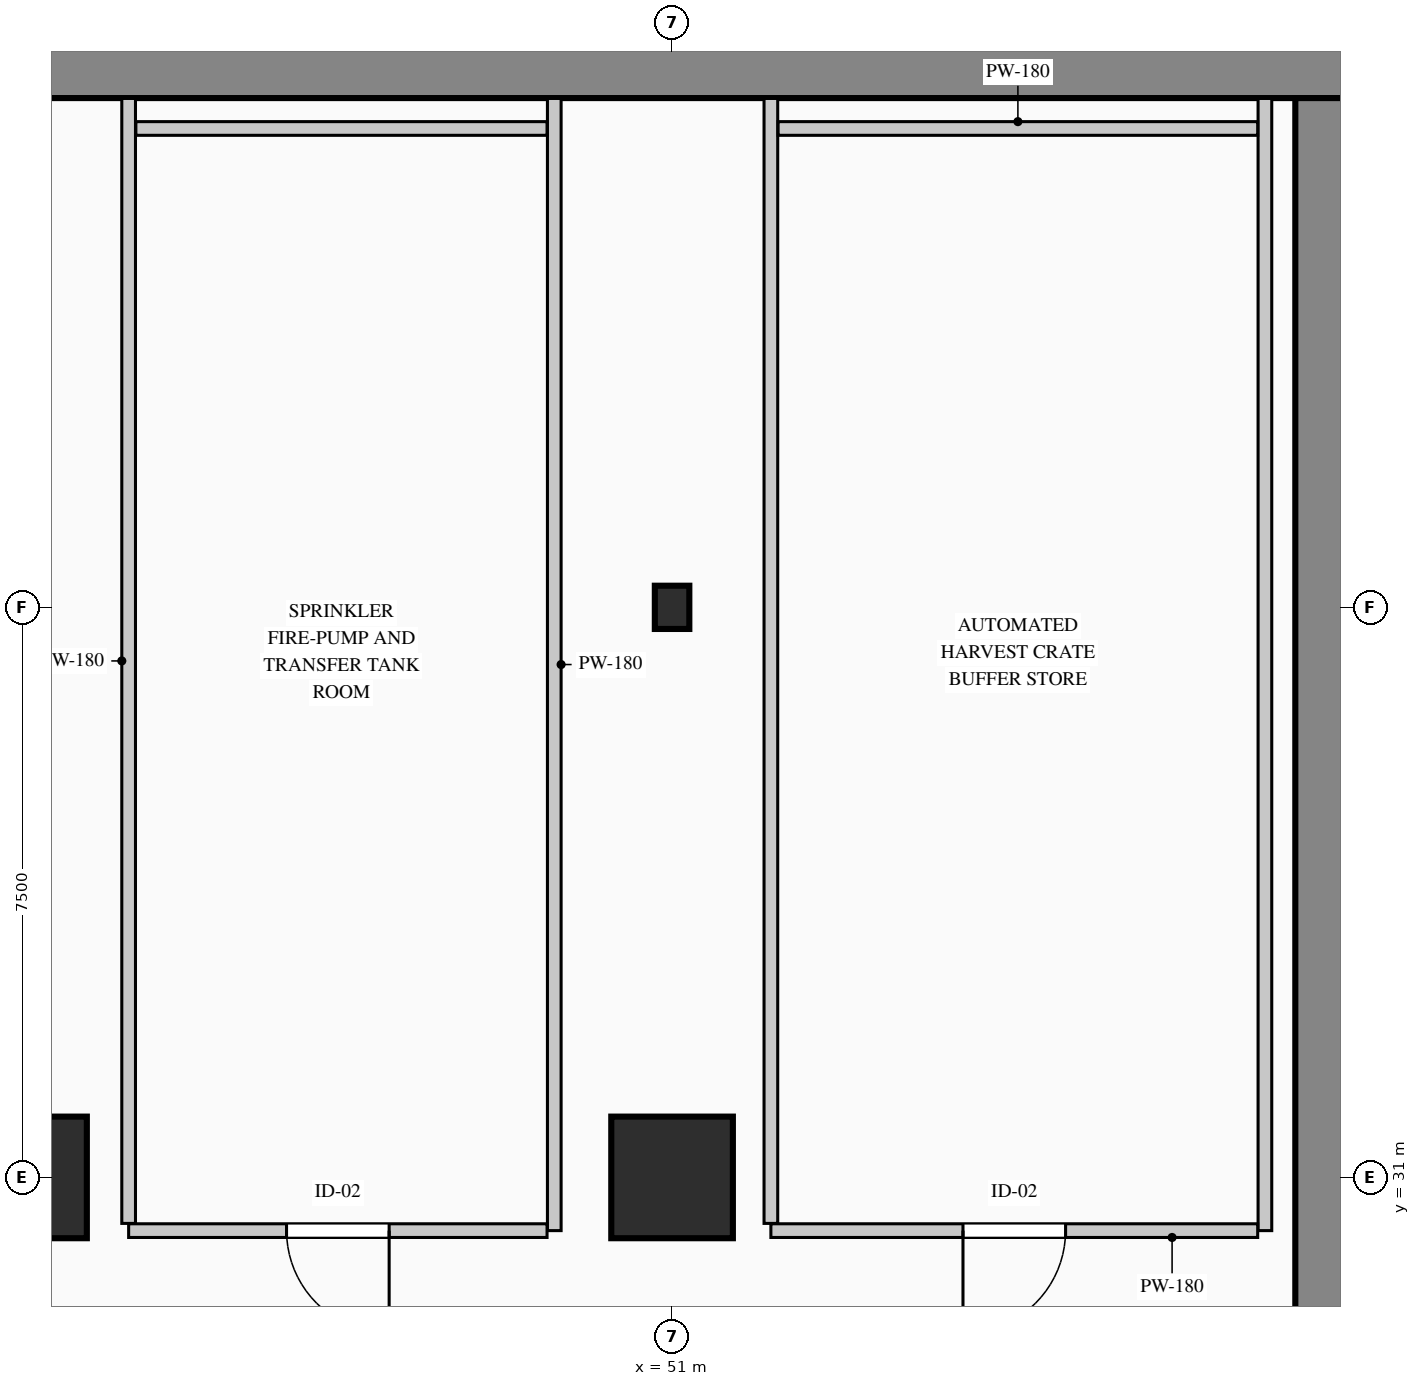
"""IFC4 building model, lengths in metres.
Left out: names, types, materials, properties, quantities, classifications, styles, units other than length and angle.
Written with IfcOpenShell. Run it as: python <this file> out.ifc"""

import sys

from ifc_helpers import new_model, si_unit, direction, frame, frame_2d, origin, origin_2d, place, context, subcontext, project, spatial, rectangle, i_section, extrude, element, fill, save


model = new_model("IFC4")
c1 = context("Model", 3, precision=1e-05, world=origin(), true_north=direction((0.0, 1.0)))
c2 = subcontext(c1, "Body", "Model", "MODEL_VIEW")
j1 = project(units=[si_unit("LENGTHUNIT", "METRE"), si_unit("PLANEANGLEUNIT", "RADIAN")], contexts=[c1])
p1 = place(None, origin())
s1 = spatial("IfcSite", under=j1, at=p1, CompositionType="ELEMENT")
p2 = place(p1, origin())
s2 = spatial("IfcBuilding", under=s1, at=p2, CompositionType="ELEMENT")
p3 = place(p2, frame((0.0, 0.0, -9.0)))
s3 = spatial("IfcBuildingStorey", under=s2, at=p3, CompositionType="ELEMENT", Elevation=-9.0)
p4 = place(p3, frame((0.0, 45.6, 0.0), z_axis=(0.0, 0.0, 1.0), x_axis=(1.0, 0.0, 0.0)))
e1 = element("IfcWall", 1, at=p4, inside=s3, PredefinedType="USERDEFINED", context=c2, shape_type="SweptSolid", body=[
    extrude(rectangle(XDim=60.0, YDim=0.8, at=frame_2d((30.0, 0.0))), origin(), (0.0, 0.0, 1.0), 4.5),
])
p5 = place(p3, frame((59.6, 0.8, 0.0), z_axis=(0.0, 0.0, 1.0), x_axis=(0.0, 1.0, 0.0)))
e2 = element("IfcWall", 2, at=p5, inside=s3, PredefinedType="USERDEFINED", context=c2, shape_type="SweptSolid", body=[
    extrude(rectangle(XDim=44.4, YDim=0.8, at=frame_2d((22.2, 0.0))), origin(), (0.0, 0.0, 1.0), 4.5),
])
for number, where, z_axis, x_axis in (
    (3, (42.5, 31.0, 0.0), (0.0, 0.0, 1.0), (1.0, 0.0, 0.0)),
    (4, (51.0, 31.0, 0.0), (0.0, 0.0, 1.0), (1.0, 0.0, 0.0)),
):
    element("IfcColumn", number, at=place(p3, frame(where, z_axis=z_axis, x_axis=x_axis)), inside=s3, PredefinedType="COLUMN", context=c2, shape_type="SweptSolid", body=[
        extrude(rectangle(XDim=1.6, YDim=1.6, at=origin_2d()), origin(), (0.0, 0.0, 1.0), 4.5),
    ])
p6 = place(p3, frame((51.0, 38.5, 0.0), z_axis=(0.0, 0.0, 1.0), x_axis=(1.0, 0.0, 0.0)))
e5 = element("IfcColumn", 5, at=p6, inside=s3, PredefinedType="COLUMN", context=c2, shape_type="SweptSolid", body=[
    extrude(i_section(OverallWidth=0.454, OverallDepth=0.569, WebThickness=0.078, FlangeThickness=0.08, FilletRadius=0.015, at=origin_2d()), origin(), (0.0, 0.0, 1.0), 4.5),
])
p7 = place(p3, frame((58.8, 45.195, 0.0), z_axis=(0.0, 0.0, 1.0), x_axis=(0.0, -1.0, 0.0)))
e6 = element("IfcWall", 6, at=p7, inside=s3, PredefinedType="PARTITIONING", context=c2, shape_type="SweptSolid", body=[
    extrude(rectangle(XDim=14.895, YDim=0.18, at=frame_2d((7.448, 0.0))), origin(), (0.0, 0.0, 1.0), 4.15),
])
p8 = place(p3, frame((58.705, 30.3, 0.0), z_axis=(0.0, 0.0, 1.0), x_axis=(-1.0, 0.0, 0.0)))
e7 = element("IfcWall", 7, at=p8, inside=s3, PredefinedType="PARTITIONING", context=c2, shape_type="SweptSolid", body=[
    extrude(rectangle(XDim=6.405, YDim=0.18, at=frame_2d((3.203, 0.0))), origin(), (0.0, 0.0, 1.0), 3.685),
])
p9 = place(p8, frame((2.528, 0.0, 0.0)))
e8 = element("IfcOpeningElement", 8, at=p9, cuts=e7, PredefinedType="OPENING", context=c2, shape_type="SweptSolid", body=[
    extrude(rectangle(XDim=1.35, YDim=2.2, at=frame_2d((0.675, 1.1))), frame((0.0, 0.1, 0.0), z_axis=(0.0, -1.0, 0.0), x_axis=(1.0, 0.0, 0.0)), (0.0, 0.0, 1.0), 0.2),
])
p10 = place(p3, frame((52.3, 30.395, 0.0), z_axis=(0.0, 0.0, 1.0), x_axis=(0.0, 1.0, 0.0)))
e9 = element("IfcWall", 9, at=p10, inside=s3, PredefinedType="PARTITIONING", context=c2, shape_type="SweptSolid", body=[
    extrude(rectangle(XDim=14.8, YDim=0.18, at=frame_2d((7.4, 0.0))), origin(), (0.0, 0.0, 1.0), 4.15),
])
p11 = place(p3, frame((52.395, 44.8, 0.0), z_axis=(0.0, 0.0, 1.0), x_axis=(1.0, 0.0, 0.0)))
e10 = element("IfcWall", 10, at=p11, inside=s3, PredefinedType="PARTITIONING", context=c2, shape_type="SweptSolid", body=[
    extrude(rectangle(XDim=6.31, YDim=0.18, at=frame_2d((3.155, 0.0))), origin(), (0.0, 0.0, 1.0), 4.15),
])
p12 = place(p3, frame((49.45, 45.195, 0.0), z_axis=(0.0, 0.0, 1.0), x_axis=(0.0, -1.0, 0.0)))
e11 = element("IfcWall", 11, at=p12, inside=s3, PredefinedType="PARTITIONING", context=c2, shape_type="SweptSolid", body=[
    extrude(rectangle(XDim=14.895, YDim=0.18, at=frame_2d((7.448, 0.0))), origin(), (0.0, 0.0, 1.0), 3.685),
])
p13 = place(p3, frame((49.355, 30.3, 0.0), z_axis=(0.0, 0.0, 1.0), x_axis=(-1.0, 0.0, 0.0)))
e12 = element("IfcWall", 12, at=p13, inside=s3, PredefinedType="PARTITIONING", context=c2, shape_type="SweptSolid", body=[
    extrude(rectangle(XDim=5.505, YDim=0.18, at=frame_2d((2.752, 0.0))), origin(), (0.0, 0.0, 1.0), 4.15),
])
p14 = place(p13, frame((2.077, 0.0, 0.0)))
e13 = element("IfcOpeningElement", 13, at=p14, cuts=e12, PredefinedType="OPENING", context=c2, shape_type="SweptSolid", body=[
    extrude(rectangle(XDim=1.35, YDim=2.2, at=frame_2d((0.675, 1.1))), frame((0.0, 0.1, 0.0), z_axis=(0.0, -1.0, 0.0), x_axis=(1.0, 0.0, 0.0)), (0.0, 0.0, 1.0), 0.2),
])
p15 = place(p3, frame((43.85, 30.395, 0.0), z_axis=(0.0, 0.0, 1.0), x_axis=(0.0, 1.0, 0.0)))
e14 = element("IfcWall", 14, at=p15, inside=s3, PredefinedType="PARTITIONING", context=c2, shape_type="SweptSolid", body=[
    extrude(rectangle(XDim=14.8, YDim=0.18, at=frame_2d((7.4, 0.0))), origin(), (0.0, 0.0, 1.0), 4.15),
])
p16 = place(p3, frame((43.945, 44.8, 0.0), z_axis=(0.0, 0.0, 1.0), x_axis=(1.0, 0.0, 0.0)))
e15 = element("IfcWall", 15, at=p16, inside=s3, PredefinedType="PARTITIONING", context=c2, shape_type="SweptSolid", body=[
    extrude(rectangle(XDim=5.41, YDim=0.18, at=frame_2d((2.705, 0.0))), origin(), (0.0, 0.0, 1.0), 4.15),
])
p17 = place(p9, origin())
e16 = element("IfcDoor", 16, at=p17, inside=s3, OperationType="SINGLE_SWING_RIGHT", PredefinedType="DOOR", context=c2, shape_type="SweptSolid", body=[
    extrude(rectangle(XDim=1.35, YDim=2.2, at=frame_2d((0.675, 1.1))), frame((0.0, 0.025, 0.0), z_axis=(0.0, -1.0, 0.0), x_axis=(1.0, 0.0, 0.0)), (0.0, 0.0, 1.0), 0.05),
])
fill(e8, e16)
p18 = place(p14, origin())
e17 = element("IfcDoor", 17, at=p18, inside=s3, OperationType="SINGLE_SWING_LEFT", PredefinedType="DOOR", context=c2, shape_type="SweptSolid", body=[
    extrude(rectangle(XDim=1.35, YDim=2.2, at=frame_2d((0.675, 1.1))), frame((0.0, 0.025, 0.0), z_axis=(0.0, -1.0, 0.0), x_axis=(1.0, 0.0, 0.0)), (0.0, 0.0, 1.0), 0.05),
])
fill(e13, e17)
save(model, sys.argv[1])
